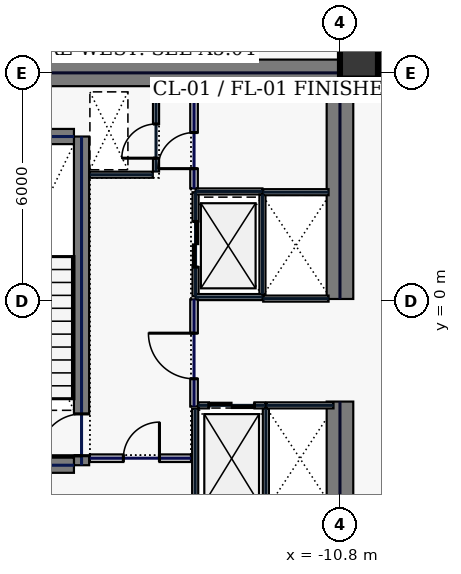
"""IFC4 building model, lengths in metres.
Left out: names, types, materials, properties, quantities, classifications, styles, units other than length and angle.
Written with IfcOpenShell. Run it as: python <this file> out.ifc"""

import sys

from ifc_helpers import new_model, si_unit, direction, frame, frame_2d, origin, origin_2d, place, context, subcontext, project, spatial, rectangle, hollow_rectangle, extrude, element, fill, save


model = new_model("IFC4")
c1 = context("Model", 3, precision=1e-05, world=origin(), true_north=direction((0.0, 1.0)))
c2 = subcontext(c1, "Body", "Model", "MODEL_VIEW")
j1 = project(units=[si_unit("LENGTHUNIT", "METRE"), si_unit("PLANEANGLEUNIT", "RADIAN")], contexts=[c1])
p1 = place(None, origin())
s1 = spatial("IfcSite", under=j1, at=p1, CompositionType="ELEMENT")
p2 = place(p1, origin())
s2 = spatial("IfcBuilding", under=s1, at=p2, CompositionType="ELEMENT")
p3 = place(p2, frame((0.0, 0.0, 109.4)))
s3 = spatial("IfcBuildingStorey", under=s2, at=p3, CompositionType="ELEMENT", Elevation=109.4)
p4 = place(p3, frame((-22.0, 6.0, 0.0), z_axis=(0.0, 0.0, 1.0), x_axis=(1.0, 0.0, 0.0)))
e1 = element("IfcWall", 1, at=p4, inside=s3, PredefinedType="SHEAR", context=c2, shape_type="SweptSolid", body=[
    extrude(rectangle(XDim=11.55, YDim=0.7, at=frame_2d((5.775, 0.0))), origin(), (0.0, 0.0, 1.0), 3.74),
])
p5 = place(p3, frame((-10.8, -5.65, 0.0), z_axis=(0.0, 0.0, 1.0), x_axis=(0.0, 1.0, 0.0)))
e2 = element("IfcWall", 2, at=p5, inside=s3, PredefinedType="SHEAR", context=c2, shape_type="SweptSolid", body=[
    extrude(rectangle(XDim=3.0, YDim=0.7, at=frame_2d((1.5, 0.0))), origin(), (0.0, 0.0, 1.0), 3.74),
])
p6 = place(p3, frame((-10.8, 0.05, 0.0), z_axis=(0.0, 0.0, 1.0), x_axis=(0.0, 1.0, 0.0)))
e3 = element("IfcWall", 3, at=p6, inside=s3, PredefinedType="SHEAR", context=c2, shape_type="SweptSolid", body=[
    extrude(rectangle(XDim=5.6, YDim=0.7, at=frame_2d((2.8, 0.0))), origin(), (0.0, 0.0, 1.0), 3.74),
])
p7 = place(p3, frame((-17.6, -4.325, 0.0), z_axis=(0.0, 0.0, 1.0), x_axis=(0.0, 1.0, 0.0)))
e4 = element("IfcWall", 4, at=p7, inside=s3, PredefinedType="SHEAR", context=c2, shape_type="SweptSolid", body=[
    extrude(rectangle(XDim=8.65, YDim=0.4, at=frame_2d((4.325, 0.0))), origin(), (0.0, 0.0, 1.0), 3.74),
])
p8 = place(p7, frame((0.25, 0.0, 0.0)))
e5 = element("IfcOpeningElement", 5, at=p8, cuts=e4, PredefinedType="OPENING", context=c2, shape_type="SweptSolid", body=[
    extrude(rectangle(XDim=1.1, YDim=2.2, at=frame_2d((0.55, 1.1))), frame((0.0, 0.21, 0.0), z_axis=(0.0, -1.0, 0.0), x_axis=(1.0, 0.0, 0.0)), (0.0, 0.0, 1.0), 0.42),
])
for number, where, z_axis, x_axis in (
    (6, (-21.2, -4.325, 0.0), (0.0, 0.0, 1.0), (1.0, 0.0, 0.0)),
    (7, (-21.2, 4.325, 0.0), (0.0, 0.0, 1.0), (1.0, 0.0, 0.0)),
):
    element("IfcWall", number, at=place(p3, frame(where, z_axis=z_axis, x_axis=x_axis)), inside=s3, PredefinedType="SHEAR", context=c2, shape_type="SweptSolid", body=[
        extrude(rectangle(XDim=3.4, YDim=0.4, at=frame_2d((1.7, 0.0))), origin(), (0.0, 0.0, 1.0), 3.74),
    ])
p9 = place(p3, frame((-10.3, 6.35, 0.0), z_axis=(0.0, 0.0, 1.0), x_axis=(1.0, 0.0, 0.0)))
e8 = element("IfcColumn", 8, at=p9, inside=s3, PredefinedType="COLUMN", context=c2, shape_type="SweptSolid", body=[
    extrude(hollow_rectangle(XDim=1.0, YDim=1.0, WallThickness=0.045, at=origin_2d()), origin(), (0.0, 0.0, 1.0), 3.74),
])
p10 = place(p3, frame((-14.6, 0.12, 0.0), z_axis=(0.0, 0.0, 1.0), x_axis=(0.0, 1.0, 0.0)))
e9 = element("IfcWall", 9, at=p10, inside=s3, PredefinedType="PARTITIONING", context=c2, shape_type="SweptSolid", body=[
    extrude(rectangle(XDim=2.74, YDim=0.16, at=frame_2d((1.37, 0.0))), origin(), (0.0, 0.0, 1.0), 3.74),
])
p11 = place(p10, frame((0.77, 0.0, 0.0)))
e10 = element("IfcOpeningElement", 10, at=p11, cuts=e9, PredefinedType="OPENING", context=c2, shape_type="SweptSolid", body=[
    extrude(rectangle(XDim=1.2, YDim=2.2, at=frame_2d((0.6, 1.1))), frame((0.0, 0.09, 0.0), z_axis=(0.0, -1.0, 0.0), x_axis=(1.0, 0.0, 0.0)), (0.0, 0.0, 1.0), 0.18),
])
for number, where, z_axis, x_axis in (
    (11, (-14.6, 0.1, 0.0), (0.0, 0.0, 1.0), (1.0, 0.0, 0.0)),
    (12, (-14.6, 2.88, 0.0), (0.0, 0.0, 1.0), (1.0, 0.0, 0.0)),
):
    element("IfcWall", number, at=place(p3, frame(where, z_axis=z_axis, x_axis=x_axis)), inside=s3, PredefinedType="PARTITIONING", context=c2, shape_type="SweptSolid", body=[
        extrude(rectangle(XDim=1.76, YDim=0.16, at=frame_2d((0.88, 0.0))), origin(), (0.0, 0.0, 1.0), 3.74),
    ])
p12 = place(p3, frame((-12.84, 0.18, 0.0), z_axis=(0.0, 0.0, 1.0), x_axis=(0.0, 1.0, 0.0)))
e13 = element("IfcWall", 13, at=p12, inside=s3, PredefinedType="PARTITIONING", context=c2, shape_type="SweptSolid", body=[
    extrude(rectangle(XDim=2.62, YDim=0.16, at=frame_2d((1.31, 0.0))), origin(), (0.0, 0.0, 1.0), 3.74),
])
p13 = place(p3, frame((-14.53, -2.75, 0.0), z_axis=(0.0, 0.0, 1.0), x_axis=(1.0, 0.0, 0.0)))
e14 = element("IfcWall", 14, at=p13, inside=s3, PredefinedType="PARTITIONING", context=c2, shape_type="SweptSolid", body=[
    extrude(rectangle(XDim=1.76, YDim=0.16, at=frame_2d((0.88, 0.0))), origin(), (0.0, 0.0, 1.0), 3.74),
])
p14 = place(p13, frame((0.28, 0.0, 0.0)))
e15 = element("IfcOpeningElement", 15, at=p14, cuts=e14, PredefinedType="OPENING", context=c2, shape_type="SweptSolid", body=[
    extrude(rectangle(XDim=1.2, YDim=2.2, at=frame_2d((0.6, 1.1))), frame((0.0, 0.09, 0.0), z_axis=(0.0, -1.0, 0.0), x_axis=(1.0, 0.0, 0.0)), (0.0, 0.0, 1.0), 0.18),
])
for number, where, z_axis, x_axis in (
    (16, (-12.75, -5.54, 0.0), (0.0, 0.0, 1.0), (0.0, 1.0, 0.0)),
    (17, (-14.61, -5.54, 0.0), (0.0, 0.0, 1.0), (0.0, 1.0, 0.0)),
):
    element("IfcWall", number, at=place(p3, frame(where, z_axis=z_axis, x_axis=x_axis)), inside=s3, PredefinedType="PARTITIONING", context=c2, shape_type="SweptSolid", body=[
        extrude(rectangle(XDim=2.7, YDim=0.16, at=frame_2d((1.35, 0.0))), origin(), (0.0, 0.0, 1.0), 3.74),
    ])
p15 = place(p3, frame((-12.73, -2.75, 0.0), z_axis=(0.0, 0.0, 1.0), x_axis=(1.0, 0.0, 0.0)))
e18 = element("IfcWall", 18, at=p15, inside=s3, PredefinedType="PARTITIONING", context=c2, shape_type="SweptSolid", body=[
    extrude(rectangle(XDim=1.76, YDim=0.16, at=frame_2d((0.88, 0.0))), origin(), (0.0, 0.0, 1.0), 3.74),
])
for number, where, z_axis, x_axis in (
    (19, (-12.82, 0.06, 0.0), (0.0, 0.0, 1.0), (1.0, 0.0, 0.0)),
    (20, (-12.82, 2.86, 0.0), (0.0, 0.0, 1.0), (1.0, 0.0, 0.0)),
):
    element("IfcWall", number, at=place(p3, frame(where, z_axis=z_axis, x_axis=x_axis)), inside=s3, PredefinedType="PARTITIONING", context=c2, shape_type="SweptSolid", body=[
        extrude(rectangle(XDim=1.72, YDim=0.16, at=frame_2d((0.86, 0.0))), origin(), (0.0, 0.0, 1.0), 3.74),
    ])
p16 = place(p3, frame((-15.64, 3.405, 0.0), z_axis=(0.0, 0.0, 1.0), x_axis=(0.0, 1.0, 0.0)))
e21 = element("IfcWall", 21, at=p16, inside=s3, PredefinedType="PARTITIONING", context=c2, shape_type="SweptSolid", body=[
    extrude(rectangle(XDim=2.155, YDim=0.16, at=frame_2d((1.078, 0.0))), origin(), (0.0, 0.0, 1.0), 3.74),
])
p17 = place(p16, frame((0.35, 0.0, 0.0)))
e22 = element("IfcOpeningElement", 22, at=p17, cuts=e21, PredefinedType="OPENING", context=c2, shape_type="SweptSolid", body=[
    extrude(rectangle(XDim=0.9, YDim=2.2, at=frame_2d((0.45, 1.1))), frame((0.0, 0.09, 0.0), z_axis=(0.0, -1.0, 0.0), x_axis=(1.0, 0.0, 0.0)), (0.0, 0.0, 1.0), 0.18),
])
p18 = place(p3, frame((-17.38, 3.32, 0.0), z_axis=(0.0, 0.0, 1.0), x_axis=(1.0, 0.0, 0.0)))
e23 = element("IfcWall", 23, at=p18, inside=s3, PredefinedType="PARTITIONING", context=c2, shape_type="SweptSolid", body=[
    extrude(rectangle(XDim=1.655, YDim=0.16, at=frame_2d((0.827, 0.0))), origin(), (0.0, 0.0, 1.0), 3.74),
])
p19 = place(p3, frame((-17.38, -4.14, 0.0), z_axis=(0.0, 0.0, 1.0), x_axis=(1.0, 0.0, 0.0)))
e24 = element("IfcWall", 24, at=p19, inside=s3, PredefinedType="SOLIDWALL", context=c2, shape_type="SweptSolid", body=[
    extrude(rectangle(XDim=2.66, YDim=0.2, at=frame_2d((1.33, 0.0))), origin(), (0.0, 0.0, 1.0), 3.74),
])
p20 = place(p19, frame((0.88, 0.0, 0.0)))
e25 = element("IfcOpeningElement", 25, at=p20, cuts=e24, PredefinedType="OPENING", context=c2, shape_type="SweptSolid", body=[
    extrude(rectangle(XDim=0.95, YDim=2.2, at=frame_2d((0.475, 1.1))), frame((0.0, 0.11, 0.0), z_axis=(0.0, -1.0, 0.0), x_axis=(1.0, 0.0, 0.0)), (0.0, 0.0, 1.0), 0.22),
])
p21 = place(p3, frame((-14.64, 2.96, 0.0), z_axis=(0.0, 0.0, 1.0), x_axis=(0.0, 1.0, 0.0)))
e26 = element("IfcWall", 26, at=p21, inside=s3, PredefinedType="SOLIDWALL", context=c2, shape_type="SweptSolid", body=[
    extrude(rectangle(XDim=2.6, YDim=0.2, at=frame_2d((1.3, 0.0))), origin(), (0.0, 0.0, 1.0), 3.74),
])
p22 = place(p21, frame((0.52, 0.0, 0.0)))
e27 = element("IfcOpeningElement", 27, at=p22, cuts=e26, PredefinedType="OPENING", context=c2, shape_type="SweptSolid", body=[
    extrude(rectangle(XDim=0.95, YDim=2.2, at=frame_2d((0.475, 1.1))), frame((0.0, 0.11, 0.0), z_axis=(0.0, -1.0, 0.0), x_axis=(1.0, 0.0, 0.0)), (0.0, 0.0, 1.0), 0.22),
])
p23 = place(p3, frame((-14.64, -2.78, 0.0), z_axis=(0.0, 0.0, 1.0), x_axis=(0.0, 1.0, 0.0)))
e28 = element("IfcWall", 28, at=p23, inside=s3, PredefinedType="SOLIDWALL", context=c2, shape_type="SweptSolid", body=[
    extrude(rectangle(XDim=2.82, YDim=0.2, at=frame_2d((1.41, 0.0))), origin(), (0.0, 0.0, 1.0), 3.74),
])
p24 = place(p23, frame((0.73, 0.0, 0.0)))
e29 = element("IfcOpeningElement", 29, at=p24, cuts=e28, PredefinedType="OPENING", context=c2, shape_type="SweptSolid", body=[
    extrude(rectangle(XDim=1.2, YDim=2.2, at=frame_2d((0.6, 1.1))), frame((0.0, 0.11, 0.0), z_axis=(0.0, -1.0, 0.0), x_axis=(1.0, 0.0, 0.0)), (0.0, 0.0, 1.0), 0.22),
])
p25 = place(p3, frame((-10.58, 6.42, 0.0), z_axis=(0.0, 0.0, 1.0), x_axis=(0.0, 1.0, 0.0)))
e30 = element("IfcWall", 30, at=p25, inside=s3, PredefinedType="PARTITIONING", context=c2, shape_type="SweptSolid", body=[
    extrude(rectangle(XDim=0.765, YDim=0.16, at=frame_2d((0.383, 0.0))), origin(), (0.0, 0.0, 1.0), 3.74),
])
p26 = place(p8, origin())
e31 = element("IfcDoor", 31, at=p26, inside=s3, OperationType="SINGLE_SWING_LEFT", PredefinedType="DOOR", context=c2, shape_type="SweptSolid", body=[
    extrude(rectangle(XDim=1.1, YDim=2.2, at=frame_2d((0.55, 1.1))), frame((0.0, 0.025, 0.0), z_axis=(0.0, -1.0, 0.0), x_axis=(1.0, 0.0, 0.0)), (0.0, 0.0, 1.0), 0.05),
])
fill(e5, e31)
p27 = place(p11, origin())
e32 = element("IfcDoor", 32, at=p27, inside=s3, OperationType="SLIDING_TO_LEFT", PredefinedType="DOOR", context=c2, shape_type="SweptSolid", body=[
    extrude(rectangle(XDim=1.2, YDim=2.2, at=frame_2d((0.6, 1.1))), frame((0.0, 0.025, 0.0), z_axis=(0.0, -1.0, 0.0), x_axis=(1.0, 0.0, 0.0)), (0.0, 0.0, 1.0), 0.05),
])
fill(e10, e32)
p28 = place(p14, origin())
e33 = element("IfcDoor", 33, at=p28, inside=s3, OperationType="SLIDING_TO_LEFT", PredefinedType="DOOR", context=c2, shape_type="SweptSolid", body=[
    extrude(rectangle(XDim=1.2, YDim=2.2, at=frame_2d((0.6, 1.1))), frame((0.0, 0.025, 0.0), z_axis=(0.0, -1.0, 0.0), x_axis=(1.0, 0.0, 0.0)), (0.0, 0.0, 1.0), 0.05),
])
fill(e15, e33)
p29 = place(p17, origin())
e34 = element("IfcDoor", 34, at=p29, inside=s3, OperationType="SINGLE_SWING_LEFT", PredefinedType="DOOR", context=c2, shape_type="SweptSolid", body=[
    extrude(rectangle(XDim=0.9, YDim=2.2, at=frame_2d((0.45, 1.1))), frame((0.0, 0.025, 0.0), z_axis=(0.0, -1.0, 0.0), x_axis=(1.0, 0.0, 0.0)), (0.0, 0.0, 1.0), 0.05),
])
fill(e22, e34)
p30 = place(p20, origin())
e35 = element("IfcDoor", 35, at=p30, inside=s3, OperationType="SINGLE_SWING_RIGHT", PredefinedType="DOOR", context=c2, shape_type="SweptSolid", body=[
    extrude(rectangle(XDim=0.95, YDim=2.2, at=frame_2d((0.475, 1.1))), frame((0.0, 0.025, 0.0), z_axis=(0.0, -1.0, 0.0), x_axis=(1.0, 0.0, 0.0)), (0.0, 0.0, 1.0), 0.05),
])
fill(e25, e35)
p31 = place(p22, origin())
e36 = element("IfcDoor", 36, at=p31, inside=s3, OperationType="SINGLE_SWING_LEFT", PredefinedType="DOOR", context=c2, shape_type="SweptSolid", body=[
    extrude(rectangle(XDim=0.95, YDim=2.2, at=frame_2d((0.475, 1.1))), frame((0.0, 0.025, 0.0), z_axis=(0.0, -1.0, 0.0), x_axis=(1.0, 0.0, 0.0)), (0.0, 0.0, 1.0), 0.05),
])
fill(e27, e36)
p32 = place(p24, origin())
e37 = element("IfcDoor", 37, at=p32, inside=s3, OperationType="SINGLE_SWING_RIGHT", PredefinedType="DOOR", context=c2, shape_type="SweptSolid", body=[
    extrude(rectangle(XDim=1.2, YDim=2.2, at=frame_2d((0.6, 1.1))), frame((0.0, 0.025, 0.0), z_axis=(0.0, -1.0, 0.0), x_axis=(1.0, 0.0, 0.0)), (0.0, 0.0, 1.0), 0.05),
])
fill(e29, e37)
save(model, sys.argv[1])
